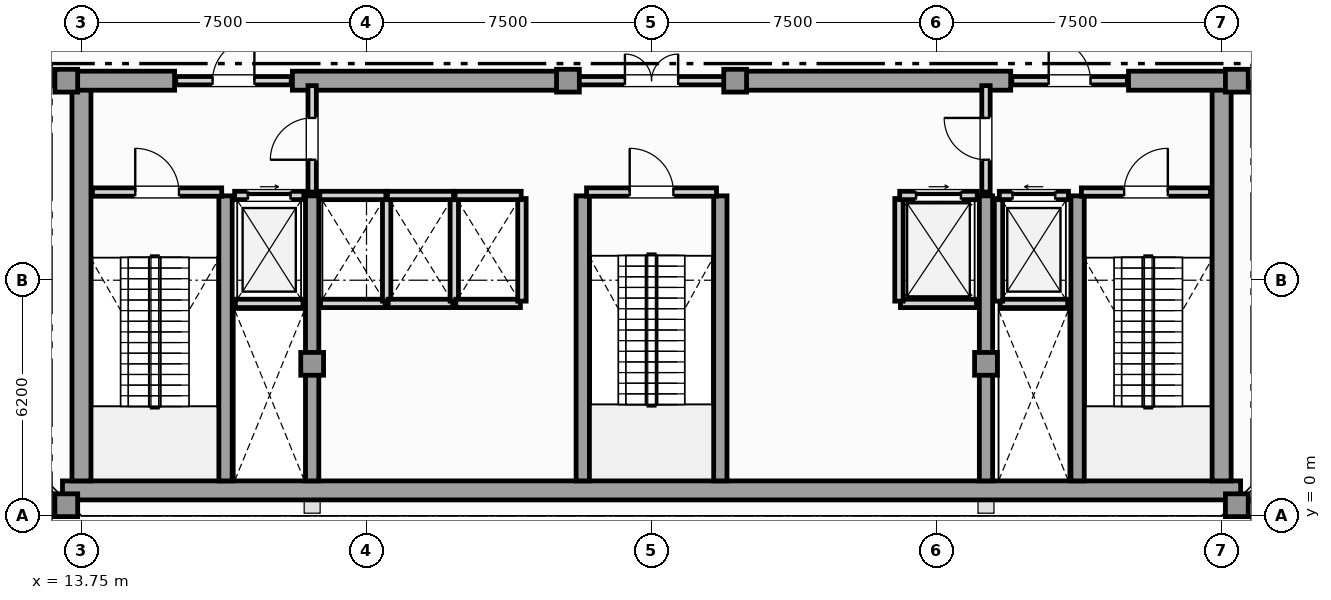
"""IFC4 building model, lengths in metres.
Left out: names, types, materials, properties, quantities, classifications, styles, units other than length and angle.
Written with IfcOpenShell. Run it as: python <this file> out.ifc"""

import sys

from ifc_helpers import new_model, si_unit, direction, frame, frame_2d, origin, origin_2d, place, context, subcontext, project, spatial, rectangle, hollow_rectangle, extrude, element, fill, save


model = new_model("IFC4")
c1 = context("Model", 3, precision=1e-05, world=origin(), true_north=direction((0.0, 1.0)))
c2 = subcontext(c1, "Body", "Model", "MODEL_VIEW")
j1 = project(units=[si_unit("LENGTHUNIT", "METRE"), si_unit("PLANEANGLEUNIT", "RADIAN")], contexts=[c1])
p1 = place(None, origin())
s1 = spatial("IfcSite", under=j1, at=p1, CompositionType="ELEMENT")
p2 = place(p1, origin())
s2 = spatial("IfcBuilding", under=s1, at=p2, CompositionType="ELEMENT")
p3 = place(p2, frame((0.0, 0.0, 366.65)))
s3 = spatial("IfcBuildingStorey", under=s2, at=p3, CompositionType="ELEMENT", Elevation=366.65)
p4 = place(p3, frame((13.25, 0.67, 0.0), z_axis=(0.0, 0.0, 1.0), x_axis=(1.0, 0.0, 0.0)))
e1 = element("IfcWall", 1, at=p4, inside=s3, PredefinedType="SHEAR", context=c2, shape_type="SweptSolid", body=[
    extrude(rectangle(XDim=31.0, YDim=0.5, at=frame_2d((15.5, 0.0))), origin(), (0.0, 0.0, 1.0), 5.1),
])
for number, where, z_axis, x_axis in (
    (2, (13.75, 0.92, 0.0), (0.0, 0.0, 1.0), (0.0, 1.0, 0.0)),
    (3, (43.75, 0.92, 0.0), (0.0, 0.0, 1.0), (0.0, 1.0, 0.0)),
):
    element("IfcWall", number, at=place(p3, frame(where, z_axis=z_axis, x_axis=x_axis)), inside=s3, PredefinedType="SHEAR", context=c2, shape_type="SweptSolid", body=[
        extrude(rectangle(XDim=10.53, YDim=0.5, at=frame_2d((5.265, 0.0))), origin(), (0.0, 0.0, 1.0), 5.1),
    ])
p5 = place(p3, frame((13.25, 11.45, 0.0), z_axis=(0.0, 0.0, 1.0), x_axis=(1.0, 0.0, 0.0)))
e4 = element("IfcWall", 4, at=p5, inside=s3, PredefinedType="SHEAR", context=c2, shape_type="SweptSolid", body=[
    extrude(rectangle(XDim=2.95, YDim=0.5, at=frame_2d((1.475, 0.0))), origin(), (0.0, 0.0, 1.0), 5.1),
])
for number, where, z_axis, x_axis in (
    (5, (19.3, 11.45, 0.0), (0.0, 0.0, 1.0), (1.0, 0.0, 0.0)),
    (6, (30.9, 11.45, 0.0), (0.0, 0.0, 1.0), (1.0, 0.0, 0.0)),
):
    element("IfcWall", number, at=place(p3, frame(where, z_axis=z_axis, x_axis=x_axis)), inside=s3, PredefinedType="SHEAR", context=c2, shape_type="SweptSolid", body=[
        extrude(rectangle(XDim=7.3, YDim=0.5, at=frame_2d((3.65, 0.0))), origin(), (0.0, 0.0, 1.0), 5.1),
    ])
p6 = place(p3, frame((41.3, 11.45, 0.0), z_axis=(0.0, 0.0, 1.0), x_axis=(1.0, 0.0, 0.0)))
e7 = element("IfcWall", 7, at=p6, inside=s3, PredefinedType="SHEAR", context=c2, shape_type="SweptSolid", body=[
    extrude(rectangle(XDim=2.95, YDim=0.5, at=frame_2d((1.475, 0.0))), origin(), (0.0, 0.0, 1.0), 5.1),
])
for number, where, z_axis, x_axis in (
    (8, (17.54, 0.92, 0.0), (0.0, 0.0, 1.0), (0.0, 1.0, 0.0)),
    (9, (19.82, 0.92, 0.0), (0.0, 0.0, 1.0), (0.0, 1.0, 0.0)),
    (10, (26.94, 0.92, 0.0), (0.0, 0.0, 1.0), (0.0, 1.0, 0.0)),
    (11, (30.56, 0.92, 0.0), (0.0, 0.0, 1.0), (0.0, 1.0, 0.0)),
    (12, (37.55, 0.92, 0.0), (0.0, 0.0, 1.0), (0.0, 1.0, 0.0)),
    (13, (39.96, 0.92, 0.0), (0.0, 0.0, 1.0), (0.0, 1.0, 0.0)),
):
    element("IfcWall", number, at=place(p3, frame(where, z_axis=z_axis, x_axis=x_axis)), inside=s3, PredefinedType="SHEAR", context=c2, shape_type="SweptSolid", body=[
        extrude(rectangle(XDim=7.5, YDim=0.35, at=frame_2d((3.75, 0.0))), origin(), (0.0, 0.0, 1.0), 5.1),
    ])
for number, where, z_axis, x_axis in (
    (14, (13.35, 0.28, 0.0), (0.0, 0.0, 1.0), (1.0, 0.0, 0.0)),
    (15, (44.15, 0.28, 0.0), (0.0, 0.0, 1.0), (1.0, 0.0, 0.0)),
    (16, (13.35, 11.45, 0.0), (0.0, 0.0, 1.0), (1.0, 0.0, 0.0)),
    (17, (44.15, 11.45, 0.0), (0.0, 0.0, 1.0), (1.0, 0.0, 0.0)),
    (18, (19.82, 4.0, 0.0), (0.0, 0.0, 1.0), (1.0, 0.0, 0.0)),
    (19, (37.55, 4.0, 0.0), (0.0, 0.0, 1.0), (1.0, 0.0, 0.0)),
    (20, (26.55, 11.45, 0.0), (0.0, 0.0, 1.0), (1.0, 0.0, 0.0)),
    (21, (30.95, 11.45, 0.0), (0.0, 0.0, 1.0), (1.0, 0.0, 0.0)),
):
    element("IfcColumn", number, at=place(p3, frame(where, z_axis=z_axis, x_axis=x_axis)), inside=s3, PredefinedType="USERDEFINED", context=c2, shape_type="SweptSolid", body=[
        extrude(hollow_rectangle(XDim=0.6, YDim=0.6, WallThickness=0.04, at=origin_2d()), origin(), (0.0, 0.0, 1.0), 5.4),
    ])
p7 = place(p3, frame((17.8, 5.59, 0.0), z_axis=(0.0, 0.0, 1.0), x_axis=(1.0, 0.0, 0.0)))
e22 = element("IfcWall", 22, at=p7, inside=s3, PredefinedType="SOLIDWALL", context=c2, shape_type="SweptSolid", body=[
    extrude(rectangle(XDim=1.78, YDim=0.22, at=frame_2d((0.89, 0.0))), origin(), (0.0, 0.0, 1.0), 5.1),
])
p8 = place(p3, frame((17.78, 8.43, 0.0), z_axis=(0.0, 0.0, 1.0), x_axis=(1.0, 0.0, 0.0)))
e23 = element("IfcWall", 23, at=p8, inside=s3, PredefinedType="SOLIDWALL", context=c2, shape_type="SweptSolid", body=[
    extrude(rectangle(XDim=1.82, YDim=0.22, at=frame_2d((0.91, 0.0))), origin(), (0.0, 0.0, 1.0), 5.1),
])
p9 = place(p8, frame((0.35, 0.0, 0.0)))
e24 = element("IfcOpeningElement", 24, at=p9, cuts=e23, PredefinedType="OPENING", context=c2, shape_type="SweptSolid", body=[
    extrude(rectangle(XDim=1.12, YDim=2.25, at=frame_2d((0.56, 1.125))), frame((0.0, 0.12, 0.0), z_axis=(0.0, -1.0, 0.0), x_axis=(1.0, 0.0, 0.0)), (0.0, 0.0, 1.0), 0.24),
])
p10 = place(p3, frame((37.92, 5.59, 0.0), z_axis=(0.0, 0.0, 1.0), x_axis=(1.0, 0.0, 0.0)))
e25 = element("IfcWall", 25, at=p10, inside=s3, PredefinedType="SOLIDWALL", context=c2, shape_type="SweptSolid", body=[
    extrude(rectangle(XDim=1.78, YDim=0.22, at=frame_2d((0.89, 0.0))), origin(), (0.0, 0.0, 1.0), 5.1),
])
p11 = place(p3, frame((37.88, 5.65, 0.0), z_axis=(0.0, 0.0, 1.0), x_axis=(0.0, 1.0, 0.0)))
e26 = element("IfcWall", 26, at=p11, inside=s3, PredefinedType="SOLIDWALL", context=c2, shape_type="SweptSolid", body=[
    extrude(rectangle(XDim=2.7, YDim=0.22, at=frame_2d((1.35, 0.0))), origin(), (0.0, 0.0, 1.0), 5.1),
])
p12 = place(p3, frame((37.9, 8.43, 0.0), z_axis=(0.0, 0.0, 1.0), x_axis=(1.0, 0.0, 0.0)))
e27 = element("IfcWall", 27, at=p12, inside=s3, PredefinedType="SOLIDWALL", context=c2, shape_type="SweptSolid", body=[
    extrude(rectangle(XDim=1.82, YDim=0.22, at=frame_2d((0.91, 0.0))), origin(), (0.0, 0.0, 1.0), 5.1),
])
p13 = place(p12, frame((0.35, 0.0, 0.0)))
e28 = element("IfcOpeningElement", 28, at=p13, cuts=e27, PredefinedType="OPENING", context=c2, shape_type="SweptSolid", body=[
    extrude(rectangle(XDim=1.12, YDim=2.25, at=frame_2d((0.56, 1.125))), frame((0.0, 0.12, 0.0), z_axis=(0.0, -1.0, 0.0), x_axis=(1.0, 0.0, 0.0)), (0.0, 0.0, 1.0), 0.24),
])
p14 = place(p3, frame((35.3, 5.59, 0.0), z_axis=(0.0, 0.0, 1.0), x_axis=(1.0, 0.0, 0.0)))
e29 = element("IfcWall", 29, at=p14, inside=s3, PredefinedType="SOLIDWALL", context=c2, shape_type="SweptSolid", body=[
    extrude(rectangle(XDim=2.0, YDim=0.22, at=frame_2d((1.0, 0.0))), origin(), (0.0, 0.0, 1.0), 5.1),
])
p15 = place(p3, frame((35.26, 5.65, 0.0), z_axis=(0.0, 0.0, 1.0), x_axis=(0.0, 1.0, 0.0)))
e30 = element("IfcWall", 30, at=p15, inside=s3, PredefinedType="SOLIDWALL", context=c2, shape_type="SweptSolid", body=[
    extrude(rectangle(XDim=2.7, YDim=0.22, at=frame_2d((1.35, 0.0))), origin(), (0.0, 0.0, 1.0), 5.1),
])
p16 = place(p3, frame((35.28, 8.43, 0.0), z_axis=(0.0, 0.0, 1.0), x_axis=(1.0, 0.0, 0.0)))
e31 = element("IfcWall", 31, at=p16, inside=s3, PredefinedType="SOLIDWALL", context=c2, shape_type="SweptSolid", body=[
    extrude(rectangle(XDim=2.04, YDim=0.22, at=frame_2d((1.02, 0.0))), origin(), (0.0, 0.0, 1.0), 5.1),
])
p17 = place(p16, frame((0.43, 0.0, 0.0)))
e32 = element("IfcOpeningElement", 32, at=p17, cuts=e31, PredefinedType="OPENING", context=c2, shape_type="SweptSolid", body=[
    extrude(rectangle(XDim=1.18, YDim=2.2, at=frame_2d((0.59, 1.1))), frame((0.0, 0.12, 0.0), z_axis=(0.0, -1.0, 0.0), x_axis=(1.0, 0.0, 0.0)), (0.0, 0.0, 1.0), 0.24),
])
p18 = place(p3, frame((20.04, 5.59, 0.0), z_axis=(0.0, 0.0, 1.0), x_axis=(1.0, 0.0, 0.0)))
e33 = element("IfcWall", 33, at=p18, inside=s3, PredefinedType="SOLIDWALL", context=c2, shape_type="SweptSolid", body=[
    extrude(rectangle(XDim=1.7, YDim=0.22, at=frame_2d((0.85, 0.0))), origin(), (0.0, 0.0, 1.0), 5.1),
])
p19 = place(p3, frame((21.78, 5.65, 0.0), z_axis=(0.0, 0.0, 1.0), x_axis=(0.0, 1.0, 0.0)))
e34 = element("IfcWall", 34, at=p19, inside=s3, PredefinedType="SOLIDWALL", context=c2, shape_type="SweptSolid", body=[
    extrude(rectangle(XDim=2.7, YDim=0.22, at=frame_2d((1.35, 0.0))), origin(), (0.0, 0.0, 1.0), 5.1),
])
p20 = place(p3, frame((20.02, 8.43, 0.0), z_axis=(0.0, 0.0, 1.0), x_axis=(1.0, 0.0, 0.0)))
e35 = element("IfcWall", 35, at=p20, inside=s3, PredefinedType="SOLIDWALL", context=c2, shape_type="SweptSolid", body=[
    extrude(rectangle(XDim=1.74, YDim=0.22, at=frame_2d((0.87, 0.0))), origin(), (0.0, 0.0, 1.0), 5.1),
])
p21 = place(p3, frame((21.82, 5.59, 0.0), z_axis=(0.0, 0.0, 1.0), x_axis=(1.0, 0.0, 0.0)))
e36 = element("IfcWall", 36, at=p21, inside=s3, PredefinedType="SOLIDWALL", context=c2, shape_type="SweptSolid", body=[
    extrude(rectangle(XDim=1.7, YDim=0.22, at=frame_2d((0.85, 0.0))), origin(), (0.0, 0.0, 1.0), 5.1),
])
p22 = place(p3, frame((23.56, 5.65, 0.0), z_axis=(0.0, 0.0, 1.0), x_axis=(0.0, 1.0, 0.0)))
e37 = element("IfcWall", 37, at=p22, inside=s3, PredefinedType="SOLIDWALL", context=c2, shape_type="SweptSolid", body=[
    extrude(rectangle(XDim=2.7, YDim=0.22, at=frame_2d((1.35, 0.0))), origin(), (0.0, 0.0, 1.0), 5.1),
])
p23 = place(p3, frame((21.8, 8.43, 0.0), z_axis=(0.0, 0.0, 1.0), x_axis=(1.0, 0.0, 0.0)))
e38 = element("IfcWall", 38, at=p23, inside=s3, PredefinedType="SOLIDWALL", context=c2, shape_type="SweptSolid", body=[
    extrude(rectangle(XDim=1.74, YDim=0.22, at=frame_2d((0.87, 0.0))), origin(), (0.0, 0.0, 1.0), 5.1),
])
p24 = place(p3, frame((23.6, 5.59, 0.0), z_axis=(0.0, 0.0, 1.0), x_axis=(1.0, 0.0, 0.0)))
e39 = element("IfcWall", 39, at=p24, inside=s3, PredefinedType="SOLIDWALL", context=c2, shape_type="SweptSolid", body=[
    extrude(rectangle(XDim=1.7, YDim=0.22, at=frame_2d((0.85, 0.0))), origin(), (0.0, 0.0, 1.0), 5.1),
])
p25 = place(p3, frame((25.34, 5.65, 0.0), z_axis=(0.0, 0.0, 1.0), x_axis=(0.0, 1.0, 0.0)))
e40 = element("IfcWall", 40, at=p25, inside=s3, PredefinedType="SOLIDWALL", context=c2, shape_type="SweptSolid", body=[
    extrude(rectangle(XDim=2.7, YDim=0.22, at=frame_2d((1.35, 0.0))), origin(), (0.0, 0.0, 1.0), 5.1),
])
p26 = place(p3, frame((23.58, 8.43, 0.0), z_axis=(0.0, 0.0, 1.0), x_axis=(1.0, 0.0, 0.0)))
e41 = element("IfcWall", 41, at=p26, inside=s3, PredefinedType="SOLIDWALL", context=c2, shape_type="SweptSolid", body=[
    extrude(rectangle(XDim=1.74, YDim=0.22, at=frame_2d((0.87, 0.0))), origin(), (0.0, 0.0, 1.0), 5.1),
])
p27 = place(p3, frame((14.04, 8.52, 0.0), z_axis=(0.0, 0.0, 1.0), x_axis=(1.0, 0.0, 0.0)))
e42 = element("IfcWall", 42, at=p27, inside=s3, PredefinedType="SOLIDWALL", context=c2, shape_type="SweptSolid", body=[
    extrude(rectangle(XDim=3.4, YDim=0.22, at=frame_2d((1.7, 0.0))), origin(), (0.0, 0.0, 1.0), 5.1),
])
p28 = place(p27, frame((1.125, 0.0, 0.0)))
e43 = element("IfcOpeningElement", 43, at=p28, cuts=e42, PredefinedType="OPENING", context=c2, shape_type="SweptSolid", body=[
    extrude(rectangle(XDim=1.15, YDim=2.2, at=frame_2d((0.575, 1.1))), frame((0.0, 0.12, 0.0), z_axis=(0.0, -1.0, 0.0), x_axis=(1.0, 0.0, 0.0)), (0.0, 0.0, 1.0), 0.24),
])
p29 = place(p3, frame((40.06, 8.52, 0.0), z_axis=(0.0, 0.0, 1.0), x_axis=(1.0, 0.0, 0.0)))
e44 = element("IfcWall", 44, at=p29, inside=s3, PredefinedType="SOLIDWALL", context=c2, shape_type="SweptSolid", body=[
    extrude(rectangle(XDim=3.4, YDim=0.22, at=frame_2d((1.7, 0.0))), origin(), (0.0, 0.0, 1.0), 5.1),
])
p30 = place(p29, frame((1.125, 0.0, 0.0)))
e45 = element("IfcOpeningElement", 45, at=p30, cuts=e44, PredefinedType="OPENING", context=c2, shape_type="SweptSolid", body=[
    extrude(rectangle(XDim=1.15, YDim=2.2, at=frame_2d((0.575, 1.1))), frame((0.0, 0.12, 0.0), z_axis=(0.0, -1.0, 0.0), x_axis=(1.0, 0.0, 0.0)), (0.0, 0.0, 1.0), 0.24),
])
p31 = place(p3, frame((27.04, 8.52, 0.0), z_axis=(0.0, 0.0, 1.0), x_axis=(1.0, 0.0, 0.0)))
e46 = element("IfcWall", 46, at=p31, inside=s3, PredefinedType="SOLIDWALL", context=c2, shape_type="SweptSolid", body=[
    extrude(rectangle(XDim=3.42, YDim=0.22, at=frame_2d((1.71, 0.0))), origin(), (0.0, 0.0, 1.0), 5.1),
])
p32 = place(p31, frame((1.135, 0.0, 0.0)))
e47 = element("IfcOpeningElement", 47, at=p32, cuts=e46, PredefinedType="OPENING", context=c2, shape_type="SweptSolid", body=[
    extrude(rectangle(XDim=1.15, YDim=2.2, at=frame_2d((0.575, 1.1))), frame((0.0, 0.12, 0.0), z_axis=(0.0, -1.0, 0.0), x_axis=(1.0, 0.0, 0.0)), (0.0, 0.0, 1.0), 0.24),
])
p33 = place(p3, frame((19.82, 8.52, 0.0), z_axis=(0.0, 0.0, 1.0), x_axis=(0.0, 1.0, 0.0)))
e48 = element("IfcWall", 48, at=p33, inside=s3, PredefinedType="SOLIDWALL", context=c2, shape_type="SweptSolid", body=[
    extrude(rectangle(XDim=2.8, YDim=0.22, at=frame_2d((1.4, 0.0))), origin(), (0.0, 0.0, 1.0), 4.556),
])
p34 = place(p33, frame((0.85, 0.0, 0.0)))
e49 = element("IfcOpeningElement", 49, at=p34, cuts=e48, PredefinedType="OPENING", context=c2, shape_type="SweptSolid", body=[
    extrude(rectangle(XDim=1.1, YDim=2.2, at=frame_2d((0.55, 1.1))), frame((0.0, 0.12, 0.0), z_axis=(0.0, -1.0, 0.0), x_axis=(1.0, 0.0, 0.0)), (0.0, 0.0, 1.0), 0.24),
])
p35 = place(p3, frame((37.55, 8.52, 0.0), z_axis=(0.0, 0.0, 1.0), x_axis=(0.0, 1.0, 0.0)))
e50 = element("IfcWall", 50, at=p35, inside=s3, PredefinedType="SOLIDWALL", context=c2, shape_type="SweptSolid", body=[
    extrude(rectangle(XDim=2.8, YDim=0.22, at=frame_2d((1.4, 0.0))), origin(), (0.0, 0.0, 1.0), 4.556),
])
p36 = place(p35, frame((0.85, 0.0, 0.0)))
e51 = element("IfcOpeningElement", 51, at=p36, cuts=e50, PredefinedType="OPENING", context=c2, shape_type="SweptSolid", body=[
    extrude(rectangle(XDim=1.1, YDim=2.2, at=frame_2d((0.55, 1.1))), frame((0.0, 0.12, 0.0), z_axis=(0.0, -1.0, 0.0), x_axis=(1.0, 0.0, 0.0)), (0.0, 0.0, 1.0), 0.24),
])
p37 = place(p3, frame((16.23, 11.45, 0.0), z_axis=(0.0, 0.0, 1.0), x_axis=(1.0, 0.0, 0.0)))
e52 = element("IfcWall", 52, at=p37, inside=s3, PredefinedType="SOLIDWALL", context=c2, shape_type="SweptSolid", body=[
    extrude(rectangle(XDim=3.04, YDim=0.22, at=frame_2d((1.52, 0.0))), origin(), (0.0, 0.0, 1.0), 5.1),
])
p38 = place(p37, frame((0.97, 0.0, 0.0)))
e53 = element("IfcOpeningElement", 53, at=p38, cuts=e52, PredefinedType="OPENING", context=c2, shape_type="SweptSolid", body=[
    extrude(rectangle(XDim=1.1, YDim=2.2, at=frame_2d((0.55, 1.1))), frame((0.0, 0.12, 0.0), z_axis=(0.0, -1.0, 0.0), x_axis=(1.0, 0.0, 0.0)), (0.0, 0.0, 1.0), 0.24),
])
p39 = place(p3, frame((26.63, 11.45, 0.0), z_axis=(0.0, 0.0, 1.0), x_axis=(1.0, 0.0, 0.0)))
e54 = element("IfcWall", 54, at=p39, inside=s3, PredefinedType="SOLIDWALL", context=c2, shape_type="SweptSolid", body=[
    extrude(rectangle(XDim=4.24, YDim=0.22, at=frame_2d((2.12, 0.0))), origin(), (0.0, 0.0, 1.0), 5.1),
])
p40 = place(p39, frame((1.42, 0.0, 0.0)))
e55 = element("IfcOpeningElement", 55, at=p40, cuts=e54, PredefinedType="OPENING", context=c2, shape_type="SweptSolid", body=[
    extrude(rectangle(XDim=1.4, YDim=2.2, at=frame_2d((0.7, 1.1))), frame((0.0, 0.12, 0.0), z_axis=(0.0, -1.0, 0.0), x_axis=(1.0, 0.0, 0.0)), (0.0, 0.0, 1.0), 0.24),
])
p41 = place(p3, frame((38.23, 11.45, 0.0), z_axis=(0.0, 0.0, 1.0), x_axis=(1.0, 0.0, 0.0)))
e56 = element("IfcWall", 56, at=p41, inside=s3, PredefinedType="SOLIDWALL", context=c2, shape_type="SweptSolid", body=[
    extrude(rectangle(XDim=3.04, YDim=0.22, at=frame_2d((1.52, 0.0))), origin(), (0.0, 0.0, 1.0), 5.1),
])
p42 = place(p41, frame((0.97, 0.0, 0.0)))
e57 = element("IfcOpeningElement", 57, at=p42, cuts=e56, PredefinedType="OPENING", context=c2, shape_type="SweptSolid", body=[
    extrude(rectangle(XDim=1.1, YDim=2.2, at=frame_2d((0.55, 1.1))), frame((0.0, 0.12, 0.0), z_axis=(0.0, -1.0, 0.0), x_axis=(1.0, 0.0, 0.0)), (0.0, 0.0, 1.0), 0.24),
])
p43 = place(p9, origin())
e58 = element("IfcDoor", 58, at=p43, inside=s3, OperationType="SLIDING_TO_RIGHT", PredefinedType="DOOR", context=c2, shape_type="SweptSolid", body=[
    extrude(rectangle(XDim=1.12, YDim=2.25, at=frame_2d((0.56, 1.125))), frame((0.0, 0.025, 0.0), z_axis=(0.0, -1.0, 0.0), x_axis=(1.0, 0.0, 0.0)), (0.0, 0.0, 1.0), 0.05),
])
fill(e24, e58)
p44 = place(p13, origin())
e59 = element("IfcDoor", 59, at=p44, inside=s3, OperationType="SLIDING_TO_LEFT", PredefinedType="DOOR", context=c2, shape_type="SweptSolid", body=[
    extrude(rectangle(XDim=1.12, YDim=2.25, at=frame_2d((0.56, 1.125))), frame((0.0, 0.025, 0.0), z_axis=(0.0, -1.0, 0.0), x_axis=(1.0, 0.0, 0.0)), (0.0, 0.0, 1.0), 0.05),
])
fill(e28, e59)
p45 = place(p17, origin())
e60 = element("IfcDoor", 60, at=p45, inside=s3, OperationType="SLIDING_TO_RIGHT", PredefinedType="DOOR", context=c2, shape_type="SweptSolid", body=[
    extrude(rectangle(XDim=1.18, YDim=2.2, at=frame_2d((0.59, 1.1))), frame((0.0, 0.025, 0.0), z_axis=(0.0, -1.0, 0.0), x_axis=(1.0, 0.0, 0.0)), (0.0, 0.0, 1.0), 0.05),
])
fill(e32, e60)
p46 = place(p28, origin())
e61 = element("IfcDoor", 61, at=p46, inside=s3, OperationType="SINGLE_SWING_LEFT", PredefinedType="DOOR", context=c2, shape_type="SweptSolid", body=[
    extrude(rectangle(XDim=1.15, YDim=2.2, at=frame_2d((0.575, 1.1))), frame((0.0, 0.025, 0.0), z_axis=(0.0, -1.0, 0.0), x_axis=(1.0, 0.0, 0.0)), (0.0, 0.0, 1.0), 0.05),
])
fill(e43, e61)
p47 = place(p30, origin())
e62 = element("IfcDoor", 62, at=p47, inside=s3, OperationType="SINGLE_SWING_RIGHT", PredefinedType="DOOR", context=c2, shape_type="SweptSolid", body=[
    extrude(rectangle(XDim=1.15, YDim=2.2, at=frame_2d((0.575, 1.1))), frame((0.0, 0.025, 0.0), z_axis=(0.0, -1.0, 0.0), x_axis=(1.0, 0.0, 0.0)), (0.0, 0.0, 1.0), 0.05),
])
fill(e45, e62)
p48 = place(p32, origin())
e63 = element("IfcDoor", 63, at=p48, inside=s3, OperationType="SINGLE_SWING_LEFT", PredefinedType="DOOR", context=c2, shape_type="SweptSolid", body=[
    extrude(rectangle(XDim=1.15, YDim=2.2, at=frame_2d((0.575, 1.1))), frame((0.0, 0.025, 0.0), z_axis=(0.0, -1.0, 0.0), x_axis=(1.0, 0.0, 0.0)), (0.0, 0.0, 1.0), 0.05),
])
fill(e47, e63)
p49 = place(p34, origin())
e64 = element("IfcDoor", 64, at=p49, inside=s3, OperationType="SINGLE_SWING_LEFT", PredefinedType="DOOR", context=c2, shape_type="SweptSolid", body=[
    extrude(rectangle(XDim=1.1, YDim=2.2, at=frame_2d((0.55, 1.1))), frame((0.0, 0.025, 0.0), z_axis=(0.0, -1.0, 0.0), x_axis=(1.0, 0.0, 0.0)), (0.0, 0.0, 1.0), 0.05),
])
fill(e49, e64)
p50 = place(p36, origin())
e65 = element("IfcDoor", 65, at=p50, inside=s3, OperationType="SINGLE_SWING_RIGHT", PredefinedType="DOOR", context=c2, shape_type="SweptSolid", body=[
    extrude(rectangle(XDim=1.1, YDim=2.2, at=frame_2d((0.55, 1.1))), frame((0.0, 0.025, 0.0), z_axis=(0.0, -1.0, 0.0), x_axis=(1.0, 0.0, 0.0)), (0.0, 0.0, 1.0), 0.05),
])
fill(e51, e65)
p51 = place(p38, origin())
e66 = element("IfcDoor", 66, at=p51, inside=s3, OperationType="SINGLE_SWING_RIGHT", PredefinedType="DOOR", context=c2, shape_type="SweptSolid", body=[
    extrude(rectangle(XDim=1.1, YDim=2.2, at=frame_2d((0.55, 1.1))), frame((0.0, 0.025, 0.0), z_axis=(0.0, -1.0, 0.0), x_axis=(1.0, 0.0, 0.0)), (0.0, 0.0, 1.0), 0.05),
])
fill(e53, e66)
p52 = place(p40, origin())
e67 = element("IfcDoor", 67, at=p52, inside=s3, OperationType="DOUBLE_DOOR_SINGLE_SWING", PredefinedType="DOOR", context=c2, shape_type="SweptSolid", body=[
    extrude(rectangle(XDim=1.4, YDim=2.2, at=frame_2d((0.7, 1.1))), frame((0.0, 0.025, 0.0), z_axis=(0.0, -1.0, 0.0), x_axis=(1.0, 0.0, 0.0)), (0.0, 0.0, 1.0), 0.05),
])
fill(e55, e67)
p53 = place(p42, origin())
e68 = element("IfcDoor", 68, at=p53, inside=s3, OperationType="SINGLE_SWING_LEFT", PredefinedType="DOOR", context=c2, shape_type="SweptSolid", body=[
    extrude(rectangle(XDim=1.1, YDim=2.2, at=frame_2d((0.55, 1.1))), frame((0.0, 0.025, 0.0), z_axis=(0.0, -1.0, 0.0), x_axis=(1.0, 0.0, 0.0)), (0.0, 0.0, 1.0), 0.05),
])
fill(e57, e68)
save(model, sys.argv[1])
